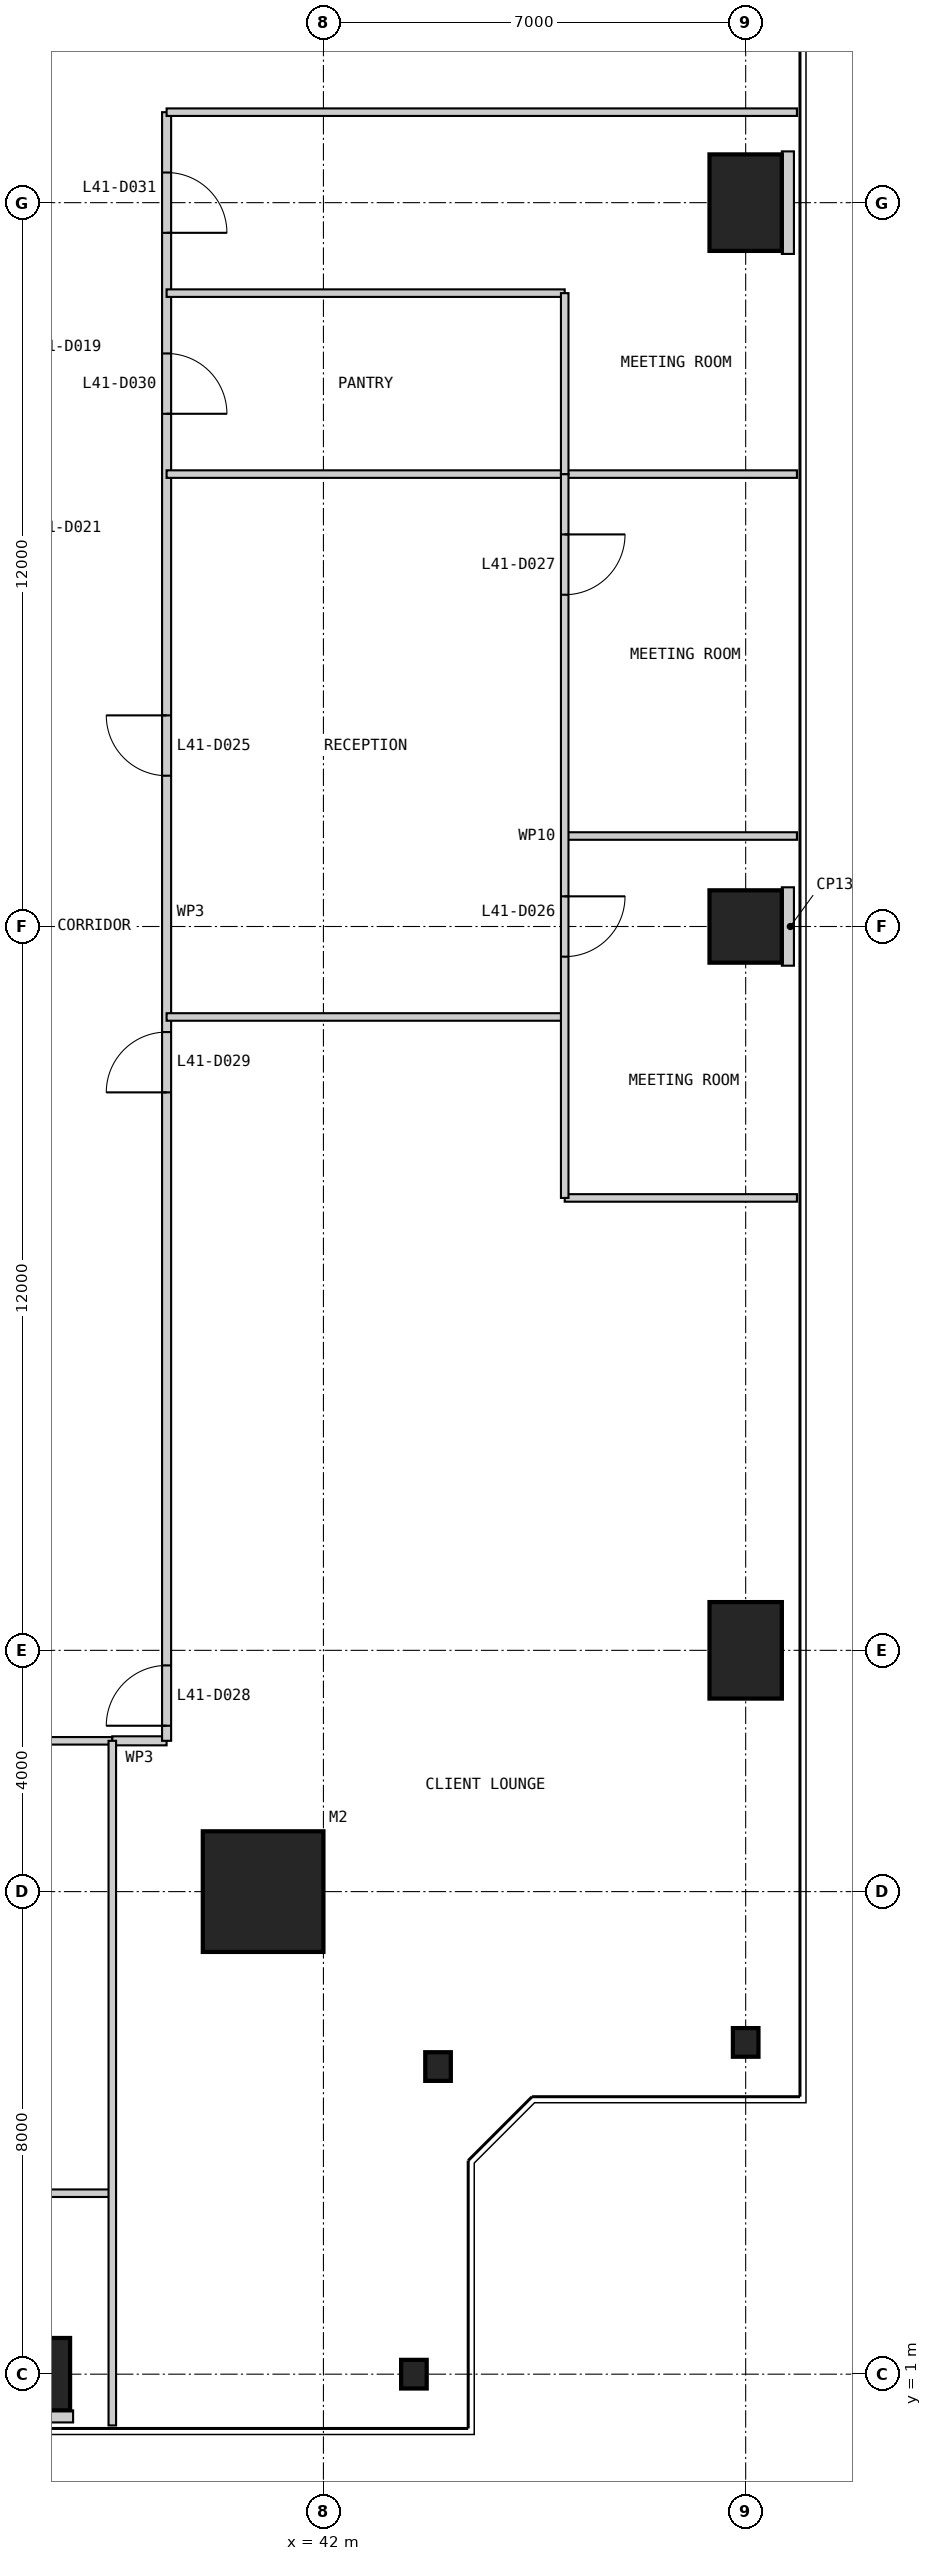
"""IFC4 building model, lengths in metres.
Left out: names, types, materials, properties, quantities, classifications, styles, units other than length and angle.
Written with IfcOpenShell. Run it as: python <this file> out.ifc"""

import sys

from ifc_helpers import new_model, si_unit, direction, frame, frame_2d, origin, origin_2d, place, context, subcontext, project, spatial, rectangle, i_section, extrude, element, fill, save


model = new_model("IFC4")
c1 = context("Model", 3, precision=1e-05, world=origin(), true_north=direction((0.0, 1.0)))
c2 = subcontext(c1, "Body", "Model", "MODEL_VIEW")
j1 = project(units=[si_unit("LENGTHUNIT", "METRE"), si_unit("PLANEANGLEUNIT", "RADIAN")], contexts=[c1])
p1 = place(None, origin())
s1 = spatial("IfcSite", under=j1, at=p1, CompositionType="ELEMENT")
p2 = place(p1, origin())
s2 = spatial("IfcBuilding", under=s1, at=p2, CompositionType="ELEMENT")
p3 = place(p2, frame((0.0, 0.0, 177.8)))
s3 = spatial("IfcBuildingStorey", under=s2, at=p3, CompositionType="ELEMENT", Elevation=177.8)
p4 = place(p3, frame((41.0, 9.0, 0.0), z_axis=(0.0, 0.0, 1.0), x_axis=(1.0, 0.0, 0.0)))
e1 = element("IfcColumn", 1, at=p4, inside=s3, PredefinedType="COLUMN", context=c2, shape_type="SweptSolid", body=[
    extrude(rectangle(XDim=2.0, YDim=2.0, at=origin_2d()), origin(), (0.0, 0.0, 1.0), 4.0),
])
p5 = place(p3, frame((37.0, 1.0, 0.0), z_axis=(0.0, 0.0, 1.0), x_axis=(1.0, 0.0, 0.0)))
e2 = element("IfcColumn", 2, at=p5, inside=s3, PredefinedType="COLUMN", context=c2, shape_type="SweptSolid", body=[
    extrude(rectangle(XDim=1.6, YDim=1.2, at=origin_2d()), origin(), (0.0, 0.0, 1.0), 4.0),
])
for number, where, z_axis, x_axis in (
    (3, (43.5, 1.0, 0.0), (0.0, 0.0, 1.0), (1.0, 0.0, 0.0)),
    (4, (43.9, 6.1, 0.0), (0.0, 0.0, 1.0), (1.0, 0.0, 0.0)),
    (5, (49.0, 6.5, 0.0), (0.0, 0.0, 1.0), (1.0, 0.0, 0.0)),
):
    element("IfcColumn", number, at=place(p3, frame(where, z_axis=z_axis, x_axis=x_axis)), inside=s3, PredefinedType="COLUMN", context=c2, shape_type="SweptSolid", body=[
        extrude(i_section(OverallWidth=0.424, OverallDepth=0.475, WebThickness=0.048, FlangeThickness=0.077, at=origin_2d()), origin(), (0.0, 0.0, 1.0), 4.0),
    ])
p6 = place(p3, frame((49.0, 13.0, 0.0), z_axis=(0.0, 0.0, 1.0), x_axis=(1.0, 0.0, 0.0)))
e6 = element("IfcColumn", 6, at=p6, inside=s3, PredefinedType="COLUMN", context=c2, shape_type="SweptSolid", body=[
    extrude(rectangle(XDim=1.2, YDim=1.6, at=origin_2d()), origin(), (0.0, 0.0, 1.0), 4.0),
])
p7 = place(p3, frame((49.0, 25.0, 0.0), z_axis=(0.0, 0.0, 1.0), x_axis=(1.0, 0.0, 0.0)))
e7 = element("IfcColumn", 7, at=p7, inside=s3, PredefinedType="COLUMN", context=c2, shape_type="SweptSolid", body=[
    extrude(rectangle(XDim=1.2, YDim=1.2, at=origin_2d()), origin(), (0.0, 0.0, 1.0), 4.0),
])
p8 = place(p3, frame((49.0, 37.0, 0.0), z_axis=(0.0, 0.0, 1.0), x_axis=(1.0, 0.0, 0.0)))
e8 = element("IfcColumn", 8, at=p8, inside=s3, PredefinedType="COLUMN", context=c2, shape_type="SweptSolid", body=[
    extrude(rectangle(XDim=1.2, YDim=1.6, at=origin_2d()), origin(), (0.0, 0.0, 1.0), 4.0),
])
p9 = place(p3, frame((32.5, 4.0, 0.0), z_axis=(0.0, 0.0, 1.0), x_axis=(1.0, 0.0, 0.0)))
e9 = element("IfcWall", 9, at=p9, inside=s3, PredefinedType="PARTITIONING", context=c2, shape_type="SweptSolid", body=[
    extrude(rectangle(XDim=6.0, YDim=0.125, at=frame_2d((3.0, 0.0))), origin(), (0.0, 0.0, 1.0), 3.85),
])
p10 = place(p3, frame((35.5, 11.5, 0.0), z_axis=(0.0, 0.0, 1.0), x_axis=(1.0, 0.0, 0.0)))
e10 = element("IfcWall", 10, at=p10, inside=s3, PredefinedType="PARTITIONING", context=c2, shape_type="SweptSolid", body=[
    extrude(rectangle(XDim=3.0, YDim=0.125, at=frame_2d((1.5, 0.0))), origin(), (0.0, 0.0, 1.0), 3.85),
])
p11 = place(p3, frame((38.5, 11.5, 0.0), z_axis=(0.0, 0.0, 1.0), x_axis=(1.0, 0.0, 0.0)))
e11 = element("IfcWall", 11, at=p11, inside=s3, PredefinedType="PARTITIONING", context=c2, shape_type="SweptSolid", body=[
    extrude(rectangle(XDim=0.9, YDim=0.15, at=frame_2d((0.45, 0.0))), origin(), (0.0, 0.0, 1.0), 3.85),
])
p12 = place(p3, frame((39.4, 11.5, 0.0), z_axis=(0.0, 0.0, 1.0), x_axis=(0.0, 1.0, 0.0)))
e12 = element("IfcWall", 12, at=p12, inside=s3, PredefinedType="PARTITIONING", context=c2, shape_type="SweptSolid", body=[
    extrude(rectangle(XDim=27.0, YDim=0.15, at=frame_2d((13.5, 0.0))), origin(), (0.0, 0.0, 1.0), 3.85),
])
p13 = place(p12, frame((16.0, 0.0, 0.0)))
e13 = element("IfcOpeningElement", 13, at=p13, cuts=e12, PredefinedType="OPENING", context=c2, shape_type="SweptSolid", body=[
    extrude(rectangle(XDim=1.0, YDim=2.2, at=frame_2d((0.5, 1.1))), frame((0.0, 0.085, 0.0), z_axis=(0.0, -1.0, 0.0), x_axis=(1.0, 0.0, 0.0)), (0.0, 0.0, 1.0), 0.17),
])
p14 = place(p12, frame((0.25, 0.0, 0.0)))
e14 = element("IfcOpeningElement", 14, at=p14, cuts=e12, PredefinedType="OPENING", context=c2, shape_type="SweptSolid", body=[
    extrude(rectangle(XDim=1.0, YDim=2.2, at=frame_2d((0.5, 1.1))), frame((0.0, 0.085, 0.0), z_axis=(0.0, -1.0, 0.0), x_axis=(1.0, 0.0, 0.0)), (0.0, 0.0, 1.0), 0.17),
])
p15 = place(p12, frame((10.75, 0.0, 0.0)))
e15 = element("IfcOpeningElement", 15, at=p15, cuts=e12, PredefinedType="OPENING", context=c2, shape_type="SweptSolid", body=[
    extrude(rectangle(XDim=1.0, YDim=2.2, at=frame_2d((0.5, 1.1))), frame((0.0, 0.085, 0.0), z_axis=(0.0, -1.0, 0.0), x_axis=(1.0, 0.0, 0.0)), (0.0, 0.0, 1.0), 0.17),
])
p16 = place(p12, frame((22.0, 0.0, 0.0)))
e16 = element("IfcOpeningElement", 16, at=p16, cuts=e12, PredefinedType="OPENING", context=c2, shape_type="SweptSolid", body=[
    extrude(rectangle(XDim=1.0, YDim=2.2, at=frame_2d((0.5, 1.1))), frame((0.0, 0.085, 0.0), z_axis=(0.0, -1.0, 0.0), x_axis=(1.0, 0.0, 0.0)), (0.0, 0.0, 1.0), 0.17),
])
p17 = place(p12, frame((25.0, 0.0, 0.0)))
e17 = element("IfcOpeningElement", 17, at=p17, cuts=e12, PredefinedType="OPENING", context=c2, shape_type="SweptSolid", body=[
    extrude(rectangle(XDim=1.0, YDim=2.2, at=frame_2d((0.5, 1.1))), frame((0.0, 0.085, 0.0), z_axis=(0.0, -1.0, 0.0), x_axis=(1.0, 0.0, 0.0)), (0.0, 0.0, 1.0), 0.17),
])
p18 = place(p3, frame((38.5, 0.15, 0.0), z_axis=(0.0, 0.0, 1.0), x_axis=(0.0, 1.0, 0.0)))
e18 = element("IfcWall", 18, at=p18, inside=s3, PredefinedType="PARTITIONING", context=c2, shape_type="SweptSolid", body=[
    extrude(rectangle(XDim=11.35, YDim=0.125, at=frame_2d((5.675, 0.0))), origin(), (0.0, 0.0, 1.0), 3.85),
])
p19 = place(p3, frame((49.85, 20.5, 0.0), z_axis=(0.0, 0.0, 1.0), x_axis=(-1.0, 0.0, 0.0)))
e19 = element("IfcWall", 19, at=p19, inside=s3, PredefinedType="PARTITIONING", context=c2, shape_type="SweptSolid", body=[
    extrude(rectangle(XDim=3.85, YDim=0.125, at=frame_2d((1.925, 0.0))), origin(), (0.0, 0.0, 1.0), 3.85),
])
p20 = place(p3, frame((46.0, 23.5, 0.0), z_axis=(0.0, 0.0, 1.0), x_axis=(-1.0, 0.0, 0.0)))
e20 = element("IfcWall", 20, at=p20, inside=s3, PredefinedType="PARTITIONING", context=c2, shape_type="SweptSolid", body=[
    extrude(rectangle(XDim=6.6, YDim=0.125, at=frame_2d((3.3, 0.0))), origin(), (0.0, 0.0, 1.0), 3.85),
])
p21 = place(p3, frame((49.85, 26.5, 0.0), z_axis=(0.0, 0.0, 1.0), x_axis=(-1.0, 0.0, 0.0)))
e21 = element("IfcWall", 21, at=p21, inside=s3, PredefinedType="PARTITIONING", context=c2, shape_type="SweptSolid", body=[
    extrude(rectangle(XDim=3.85, YDim=0.125, at=frame_2d((1.925, 0.0))), origin(), (0.0, 0.0, 1.0), 3.85),
])
p22 = place(p3, frame((49.85, 32.5, 0.0), z_axis=(0.0, 0.0, 1.0), x_axis=(-1.0, 0.0, 0.0)))
e22 = element("IfcWall", 22, at=p22, inside=s3, PredefinedType="PARTITIONING", context=c2, shape_type="SweptSolid", body=[
    extrude(rectangle(XDim=10.45, YDim=0.125, at=frame_2d((5.225, 0.0))), origin(), (0.0, 0.0, 1.0), 3.85),
])
p23 = place(p3, frame((46.0, 35.5, 0.0), z_axis=(0.0, 0.0, 1.0), x_axis=(-1.0, 0.0, 0.0)))
e23 = element("IfcWall", 23, at=p23, inside=s3, PredefinedType="PARTITIONING", context=c2, shape_type="SweptSolid", body=[
    extrude(rectangle(XDim=6.6, YDim=0.125, at=frame_2d((3.3, 0.0))), origin(), (0.0, 0.0, 1.0), 3.85),
])
p24 = place(p3, frame((46.0, 20.5, 0.0), z_axis=(0.0, 0.0, 1.0), x_axis=(0.0, 1.0, 0.0)))
e24 = element("IfcWall", 24, at=p24, inside=s3, PredefinedType="PARTITIONING", context=c2, shape_type="SweptSolid", body=[
    extrude(rectangle(XDim=12.0, YDim=0.125, at=frame_2d((6.0, 0.0))), origin(), (0.0, 0.0, 1.0), 3.238),
])
p25 = place(p24, frame((4.0, 0.0, 0.0)))
e25 = element("IfcOpeningElement", 25, at=p25, cuts=e24, PredefinedType="OPENING", context=c2, shape_type="SweptSolid", body=[
    extrude(rectangle(XDim=1.0, YDim=2.2, at=frame_2d((0.5, 1.1))), frame((0.0, 0.073, 0.0), z_axis=(0.0, -1.0, 0.0), x_axis=(1.0, 0.0, 0.0)), (0.0, 0.0, 1.0), 0.145),
])
p26 = place(p24, frame((10.0, 0.0, 0.0)))
e26 = element("IfcOpeningElement", 26, at=p26, cuts=e24, PredefinedType="OPENING", context=c2, shape_type="SweptSolid", body=[
    extrude(rectangle(XDim=1.0, YDim=2.2, at=frame_2d((0.5, 1.1))), frame((0.0, 0.073, 0.0), z_axis=(0.0, -1.0, 0.0), x_axis=(1.0, 0.0, 0.0)), (0.0, 0.0, 1.0), 0.145),
])
p27 = place(p3, frame((46.0, 32.5, 0.0), z_axis=(0.0, 0.0, 1.0), x_axis=(0.0, 1.0, 0.0)))
e27 = element("IfcWall", 27, at=p27, inside=s3, PredefinedType="PARTITIONING", context=c2, shape_type="SweptSolid", body=[
    extrude(rectangle(XDim=3.0, YDim=0.125, at=frame_2d((1.5, 0.0))), origin(), (0.0, 0.0, 1.0), 3.238),
])
p28 = place(p3, frame((49.85, 38.5, 0.0), z_axis=(0.0, 0.0, 1.0), x_axis=(-1.0, 0.0, 0.0)))
e28 = element("IfcWall", 28, at=p28, inside=s3, PredefinedType="PARTITIONING", context=c2, shape_type="SweptSolid", body=[
    extrude(rectangle(XDim=10.45, YDim=0.125, at=frame_2d((5.225, 0.0))), origin(), (0.0, 0.0, 1.0), 3.85),
])
p29 = place(p3, frame((37.0, 0.2, 0.0), z_axis=(0.0, 0.0, 1.0), x_axis=(0.0, 1.0, 0.0)))
e29 = element("IfcWall", 29, at=p29, inside=s3, PredefinedType="PARTITIONING", context=c2, shape_type="SweptSolid", body=[
    extrude(rectangle(XDim=0.2, YDim=1.7, at=frame_2d((0.1, 0.0))), origin(), (0.0, 0.0, 1.0), 3.85),
])
p30 = place(p3, frame((49.8, 25.0, 0.0), z_axis=(0.0, 0.0, 1.0), x_axis=(-1.0, 0.0, 0.0)))
e30 = element("IfcWall", 30, at=p30, inside=s3, PredefinedType="PARTITIONING", context=c2, shape_type="SweptSolid", body=[
    extrude(rectangle(XDim=0.2, YDim=1.3, at=frame_2d((0.1, 0.0))), origin(), (0.0, 0.0, 1.0), 3.85),
])
p31 = place(p3, frame((49.8, 37.0, 0.0), z_axis=(0.0, 0.0, 1.0), x_axis=(-1.0, 0.0, 0.0)))
e31 = element("IfcWall", 31, at=p31, inside=s3, PredefinedType="PARTITIONING", context=c2, shape_type="SweptSolid", body=[
    extrude(rectangle(XDim=0.2, YDim=1.7, at=frame_2d((0.1, 0.0))), origin(), (0.0, 0.0, 1.0), 3.85),
])
p32 = place(p13, origin())
e32 = element("IfcDoor", 32, at=p32, inside=s3, OperationType="SINGLE_SWING_RIGHT", PredefinedType="DOOR", context=c2, shape_type="SweptSolid", body=[
    extrude(rectangle(XDim=1.0, YDim=2.2, at=frame_2d((0.5, 1.1))), frame((0.0, 0.025, 0.0), z_axis=(0.0, -1.0, 0.0), x_axis=(1.0, 0.0, 0.0)), (0.0, 0.0, 1.0), 0.05),
])
fill(e13, e32)
p33 = place(p25, frame((1.0, 0.0, 0.0), z_axis=(0.0, 0.0, 1.0), x_axis=(-1.0, 0.0, 0.0)))
e33 = element("IfcDoor", 33, at=p33, inside=s3, OperationType="SINGLE_SWING_LEFT", PredefinedType="DOOR", context=c2, shape_type="SweptSolid", body=[
    extrude(rectangle(XDim=1.0, YDim=2.2, at=frame_2d((0.5, 1.1))), frame((0.0, 0.025, 0.0), z_axis=(0.0, -1.0, 0.0), x_axis=(1.0, 0.0, 0.0)), (0.0, 0.0, 1.0), 0.05),
])
fill(e25, e33)
p34 = place(p26, frame((1.0, 0.0, 0.0), z_axis=(0.0, 0.0, 1.0), x_axis=(-1.0, 0.0, 0.0)))
e34 = element("IfcDoor", 34, at=p34, inside=s3, OperationType="SINGLE_SWING_LEFT", PredefinedType="DOOR", context=c2, shape_type="SweptSolid", body=[
    extrude(rectangle(XDim=1.0, YDim=2.2, at=frame_2d((0.5, 1.1))), frame((0.0, 0.025, 0.0), z_axis=(0.0, -1.0, 0.0), x_axis=(1.0, 0.0, 0.0)), (0.0, 0.0, 1.0), 0.05),
])
fill(e26, e34)
p35 = place(p14, origin())
e35 = element("IfcDoor", 35, at=p35, inside=s3, OperationType="SINGLE_SWING_LEFT", PredefinedType="DOOR", context=c2, shape_type="SweptSolid", body=[
    extrude(rectangle(XDim=1.0, YDim=2.2, at=frame_2d((0.5, 1.1))), frame((0.0, 0.025, 0.0), z_axis=(0.0, -1.0, 0.0), x_axis=(1.0, 0.0, 0.0)), (0.0, 0.0, 1.0), 0.05),
])
fill(e14, e35)
p36 = place(p15, origin())
e36 = element("IfcDoor", 36, at=p36, inside=s3, OperationType="SINGLE_SWING_LEFT", PredefinedType="DOOR", context=c2, shape_type="SweptSolid", body=[
    extrude(rectangle(XDim=1.0, YDim=2.2, at=frame_2d((0.5, 1.1))), frame((0.0, 0.025, 0.0), z_axis=(0.0, -1.0, 0.0), x_axis=(1.0, 0.0, 0.0)), (0.0, 0.0, 1.0), 0.05),
])
fill(e15, e36)
p37 = place(p16, frame((1.0, 0.0, 0.0), z_axis=(0.0, 0.0, 1.0), x_axis=(-1.0, 0.0, 0.0)))
e37 = element("IfcDoor", 37, at=p37, inside=s3, OperationType="SINGLE_SWING_RIGHT", PredefinedType="DOOR", context=c2, shape_type="SweptSolid", body=[
    extrude(rectangle(XDim=1.0, YDim=2.2, at=frame_2d((0.5, 1.1))), frame((0.0, 0.025, 0.0), z_axis=(0.0, -1.0, 0.0), x_axis=(1.0, 0.0, 0.0)), (0.0, 0.0, 1.0), 0.05),
])
fill(e16, e37)
p38 = place(p17, frame((1.0, 0.0, 0.0), z_axis=(0.0, 0.0, 1.0), x_axis=(-1.0, 0.0, 0.0)))
e38 = element("IfcDoor", 38, at=p38, inside=s3, OperationType="SINGLE_SWING_RIGHT", PredefinedType="DOOR", context=c2, shape_type="SweptSolid", body=[
    extrude(rectangle(XDim=1.0, YDim=2.2, at=frame_2d((0.5, 1.1))), frame((0.0, 0.025, 0.0), z_axis=(0.0, -1.0, 0.0), x_axis=(1.0, 0.0, 0.0)), (0.0, 0.0, 1.0), 0.05),
])
fill(e17, e38)
save(model, sys.argv[1])
